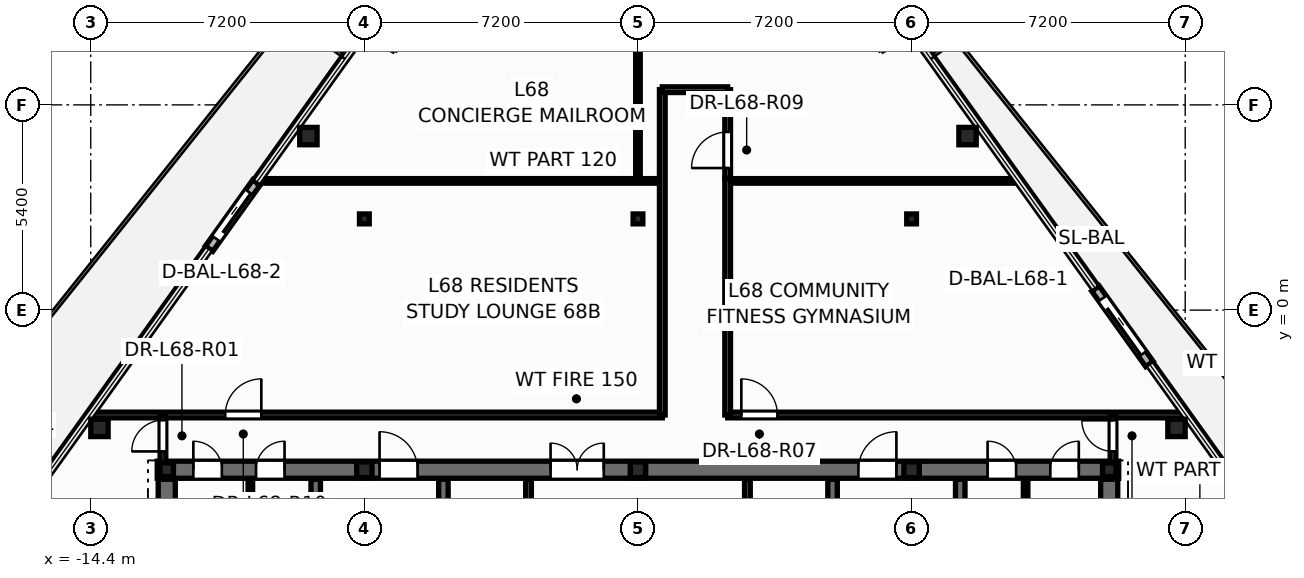
"""IFC4 building model, lengths in metres.
Left out: names, types, materials, properties, quantities, classifications, styles, units other than length and angle.
Written with IfcOpenShell. Run it as: python <this file> out.ifc"""

import sys

from ifc_helpers import new_model, si_unit, direction, frame, frame_2d, origin, origin_2d, place, context, subcontext, project, spatial, rectangle, hollow_circle, i_section, extrude, element, fill, save


model = new_model("IFC4")
c1 = context("Model", 3, precision=1e-05, world=origin(), true_north=direction((0.0, 1.0)))
c2 = subcontext(c1, "Body", "Model", "MODEL_VIEW")
j1 = project(units=[si_unit("LENGTHUNIT", "METRE"), si_unit("PLANEANGLEUNIT", "RADIAN")], contexts=[c1])
p1 = place(None, origin())
s1 = spatial("IfcSite", under=j1, at=p1, CompositionType="ELEMENT")
p2 = place(p1, origin())
s2 = spatial("IfcBuilding", under=s1, at=p2, CompositionType="ELEMENT")
p3 = place(p2, frame((0.0, 0.0, 259.8)))
s3 = spatial("IfcBuildingStorey", under=s2, at=p3, CompositionType="ELEMENT", Elevation=259.8)
for number, where, z_axis, x_axis in (
    (1, (14.171, -3.099, 0.0), (0.0, 0.0, 1.0), (1.0, 0.0, 0.0)),
    (2, (8.673, 4.579, 0.0), (0.0, 0.0, 1.0), (1.0, 0.0, 0.0)),
    (3, (-8.673, 4.579, 0.0), (0.0, 0.0, 1.0), (1.0, 0.0, 0.0)),
    (4, (-14.171, -3.099, 0.0), (0.0, 0.0, 1.0), (1.0, 0.0, 0.0)),
):
    element("IfcColumn", number, at=place(p3, frame(where, z_axis=z_axis, x_axis=x_axis)), inside=s3, PredefinedType="COLUMN", context=c2, shape_type="SweptSolid", body=[
        extrude(hollow_circle(Radius=0.229, WallThickness=0.016, at=origin_2d()), origin(), (0.0, 0.0, 1.0), 3.6),
    ])
for number, where, z_axis, x_axis in (
    (5, (12.4, -4.2, 0.0), (0.0, 0.0, 1.0), (1.0, 0.0, 0.0)),
    (6, (-12.4, -4.2, 0.0), (0.0, 0.0, 1.0), (1.0, 0.0, 0.0)),
):
    element("IfcColumn", number, at=place(p3, frame(where, z_axis=z_axis, x_axis=x_axis)), inside=s3, PredefinedType="COLUMN", context=c2, shape_type="SweptSolid", body=[
        extrude(i_section(OverallWidth=0.352, OverallDepth=0.359, WebThickness=0.018, FlangeThickness=0.026, at=origin_2d()), origin(), (0.0, 0.0, 1.0), 3.6),
    ])
for number, where, z_axis, x_axis in (
    (7, (-7.2, -4.2, 0.0), (0.0, 0.0, 1.0), (1.0, 0.0, 0.0)),
    (8, (0.0, -4.2, 0.0), (0.0, 0.0, 1.0), (1.0, 0.0, 0.0)),
    (9, (7.2, -4.2, 0.0), (0.0, 0.0, 1.0), (1.0, 0.0, 0.0)),
):
    element("IfcColumn", number, at=place(p3, frame(where, z_axis=z_axis, x_axis=x_axis)), inside=s3, PredefinedType="PILASTER", context=c2, shape_type="SweptSolid", body=[
        extrude(i_section(OverallWidth=0.405, OverallDepth=0.414, WebThickness=0.022, FlangeThickness=0.032, at=origin_2d()), origin(), (0.0, 0.0, 1.0), 3.6),
    ])
for number, where, z_axis, x_axis in (
    (10, (-7.2, 2.4, 0.0), (0.0, 0.0, 1.0), (1.0, 0.0, 0.0)),
    (11, (0.0, 2.4, 0.0), (0.0, 0.0, 1.0), (1.0, 0.0, 0.0)),
    (12, (7.2, 2.4, 0.0), (0.0, 0.0, 1.0), (1.0, 0.0, 0.0)),
):
    element("IfcColumn", number, at=place(p3, frame(where, z_axis=z_axis, x_axis=x_axis)), inside=s3, PredefinedType="COLUMN", context=c2, shape_type="SweptSolid", body=[
        extrude(i_section(OverallWidth=0.256, OverallDepth=0.26, WebThickness=0.01, FlangeThickness=0.017, at=origin_2d()), origin(), (0.0, 0.0, 1.0), 3.6),
    ])
p4 = place(p3, frame((13.458, -1.417, -0.015), z_axis=(0.0, 0.0, 1.0), x_axis=(-0.582146480264, 0.813083928949, 0.0)))
e13 = element("IfcWall", 13, at=p4, inside=s3, PredefinedType="STANDARD", context=c2, shape_type="SweptSolid", body=[
    extrude(rectangle(XDim=2.44, YDim=0.24, at=frame_2d((1.22, 0.0))), origin(), (0.0, 0.0, 1.0), 2.878),
])
p5 = place(p4, frame((0.32, 0.0, 0.015)))
e14 = element("IfcOpeningElement", 14, at=p5, cuts=e13, PredefinedType="OPENING", context=c2, shape_type="SweptSolid", body=[
    extrude(rectangle(XDim=1.806, YDim=2.204, at=frame_2d((0.9, 1.102))), frame((0.0, 0.13, 0.0), z_axis=(0.0, -1.0, 0.0), x_axis=(1.0, 0.0, 0.0)), (0.0, 0.0, 1.0), 0.26),
])
p6 = place(p3, frame((-10.039, 3.357, -0.015), z_axis=(0.0, 0.0, 1.0), x_axis=(-0.58216589686, -0.813070026832, 0.0)))
e15 = element("IfcWall", 15, at=p6, inside=s3, PredefinedType="STANDARD", context=c2, shape_type="SweptSolid", body=[
    extrude(rectangle(XDim=2.14, YDim=0.24, at=frame_2d((1.07, 0.0))), origin(), (0.0, 0.0, 1.0), 2.878),
])
p7 = place(p6, frame((0.32, 0.0, 0.015)))
e16 = element("IfcOpeningElement", 16, at=p7, cuts=e15, PredefinedType="OPENING", context=c2, shape_type="SweptSolid", body=[
    extrude(rectangle(XDim=1.506, YDim=2.204, at=frame_2d((0.75, 1.102))), frame((0.0, 0.13, 0.0), z_axis=(0.0, -1.0, 0.0), x_axis=(1.0, 0.0, 0.0)), (0.0, 0.0, 1.0), 0.26),
])
p8 = place(p3, frame((-2.88, -7.1, 0.0), z_axis=(0.0, 0.0, 1.0), x_axis=(0.0, 1.0, 0.0)))
e17 = element("IfcWall", 17, at=p8, inside=s3, PredefinedType="PARTITIONING", context=c2, shape_type="SweptSolid", body=[
    extrude(rectangle(XDim=2.65, YDim=0.15, at=frame_2d((1.325, 0.0))), origin(), (0.0, 0.0, 1.0), 3.345),
])
p9 = place(p8, frame((0.85, 0.0, 0.0)))
e18 = element("IfcOpeningElement", 18, at=p9, cuts=e17, PredefinedType="OPENING", context=c2, shape_type="SweptSolid", body=[
    extrude(rectangle(XDim=0.886, YDim=2.104, at=frame_2d((0.44, 1.052))), frame((0.0, 0.085, 0.0), z_axis=(0.0, -1.0, 0.0), x_axis=(1.0, 0.0, 0.0)), (0.0, 0.0, 1.0), 0.17),
])
p10 = place(p3, frame((2.88, -7.1, 0.0), z_axis=(0.0, 0.0, 1.0), x_axis=(0.0, 1.0, 0.0)))
e19 = element("IfcWall", 19, at=p10, inside=s3, PredefinedType="PARTITIONING", context=c2, shape_type="SweptSolid", body=[
    extrude(rectangle(XDim=2.65, YDim=0.15, at=frame_2d((1.325, 0.0))), origin(), (0.0, 0.0, 1.0), 3.345),
])
p11 = place(p10, frame((0.85, 0.0, 0.0)))
e20 = element("IfcOpeningElement", 20, at=p11, cuts=e19, PredefinedType="OPENING", context=c2, shape_type="SweptSolid", body=[
    extrude(rectangle(XDim=0.886, YDim=2.104, at=frame_2d((0.44, 1.052))), frame((0.0, 0.085, 0.0), z_axis=(0.0, -1.0, 0.0), x_axis=(1.0, 0.0, 0.0)), (0.0, 0.0, 1.0), 0.17),
])
for number, where, z_axis, x_axis in (
    (21, (-10.2, -5.52, 0.0), (0.0, 0.0, 1.0), (0.0, 1.0, 0.0)),
    (22, (10.2, -5.52, 0.0), (0.0, 0.0, 1.0), (0.0, 1.0, 0.0)),
):
    element("IfcWall", number, at=place(p3, frame(where, z_axis=z_axis, x_axis=x_axis)), inside=s3, PredefinedType="PARTITIONING", context=c2, shape_type="SweptSolid", body=[
        extrude(rectangle(XDim=1.12, YDim=0.12, at=frame_2d((0.56, 0.0))), origin(), (0.0, 0.0, 1.0), 3.345),
    ])
p12 = place(p3, frame((-12.65, -4.2, 0.0), z_axis=(0.0, 0.0, 1.0), x_axis=(1.0, 0.0, 0.0)))
e23 = element("IfcWall", 23, at=p12, inside=s3, PredefinedType="SHEAR", context=c2, shape_type="SweptSolid", body=[
    extrude(rectangle(XDim=25.3, YDim=0.45, at=frame_2d((12.65, 0.0))), origin(), (0.0, 0.0, 1.0), 3.6),
])
p13 = place(p12, frame((0.95, 0.0, 0.0)))
e24 = element("IfcOpeningElement", 24, at=p13, cuts=e23, PredefinedType="OPENING", context=c2, shape_type="SweptSolid", body=[
    extrude(rectangle(XDim=0.756, YDim=2.054, at=frame_2d((0.375, 1.027))), frame((0.0, 0.235, 0.0), z_axis=(0.0, -1.0, 0.0), x_axis=(1.0, 0.0, 0.0)), (0.0, 0.0, 1.0), 0.47),
])
p14 = place(p12, frame((2.6, 0.0, 0.0)))
e25 = element("IfcOpeningElement", 25, at=p14, cuts=e23, PredefinedType="OPENING", context=c2, shape_type="SweptSolid", body=[
    extrude(rectangle(XDim=0.756, YDim=2.054, at=frame_2d((0.375, 1.027))), frame((0.0, 0.235, 0.0), z_axis=(0.0, -1.0, 0.0), x_axis=(1.0, 0.0, 0.0)), (0.0, 0.0, 1.0), 0.47),
])
p15 = place(p12, frame((21.85, 0.0, 0.0)))
e26 = element("IfcOpeningElement", 26, at=p15, cuts=e23, PredefinedType="OPENING", context=c2, shape_type="SweptSolid", body=[
    extrude(rectangle(XDim=0.756, YDim=2.054, at=frame_2d((0.375, 1.027))), frame((0.0, 0.235, 0.0), z_axis=(0.0, -1.0, 0.0), x_axis=(1.0, 0.0, 0.0)), (0.0, 0.0, 1.0), 0.47),
])
p16 = place(p12, frame((23.5, 0.0, 0.0)))
e27 = element("IfcOpeningElement", 27, at=p16, cuts=e23, PredefinedType="OPENING", context=c2, shape_type="SweptSolid", body=[
    extrude(rectangle(XDim=0.756, YDim=2.054, at=frame_2d((0.375, 1.027))), frame((0.0, 0.235, 0.0), z_axis=(0.0, -1.0, 0.0), x_axis=(1.0, 0.0, 0.0)), (0.0, 0.0, 1.0), 0.47),
])
p17 = place(p12, frame((5.85, 0.0, 0.0)))
e28 = element("IfcOpeningElement", 28, at=p17, cuts=e23, PredefinedType="OPENING", context=c2, shape_type="SweptSolid", body=[
    extrude(rectangle(XDim=1.006, YDim=2.104, at=frame_2d((0.5, 1.052))), frame((0.0, 0.235, 0.0), z_axis=(0.0, -1.0, 0.0), x_axis=(1.0, 0.0, 0.0)), (0.0, 0.0, 1.0), 0.47),
])
p18 = place(p12, frame((10.35, 0.0, 0.0)))
e29 = element("IfcOpeningElement", 29, at=p18, cuts=e23, PredefinedType="OPENING", context=c2, shape_type="SweptSolid", body=[
    extrude(rectangle(XDim=1.406, YDim=2.154, at=frame_2d((0.7, 1.077))), frame((0.0, 0.235, 0.0), z_axis=(0.0, -1.0, 0.0), x_axis=(1.0, 0.0, 0.0)), (0.0, 0.0, 1.0), 0.47),
])
p19 = place(p12, frame((18.45, 0.0, 0.0)))
e30 = element("IfcOpeningElement", 30, at=p19, cuts=e23, PredefinedType="OPENING", context=c2, shape_type="SweptSolid", body=[
    extrude(rectangle(XDim=1.006, YDim=2.104, at=frame_2d((0.5, 1.052))), frame((0.0, 0.235, 0.0), z_axis=(0.0, -1.0, 0.0), x_axis=(1.0, 0.0, 0.0)), (0.0, 0.0, 1.0), 0.47),
])
p20 = place(p3, frame((-8.48, -13.85, 0.0), z_axis=(0.0, 0.0, 1.0), x_axis=(0.0, 1.0, 0.0)))
e31 = element("IfcWall", 31, at=p20, inside=s3, PredefinedType="SHEAR", context=c2, shape_type="SweptSolid", body=[
    extrude(rectangle(XDim=9.4, YDim=0.25, at=frame_2d((4.7, 0.0))), origin(), (0.0, 0.0, 1.0), 3.6),
])
p21 = place(p20, frame((6.95, 0.0, 0.0)))
e32 = element("IfcOpeningElement", 32, at=p21, cuts=e31, PredefinedType="OPENING", context=c2, shape_type="SweptSolid", body=[
    extrude(rectangle(XDim=1.006, YDim=2.104, at=frame_2d((0.5, 1.052))), frame((0.0, 0.135, 0.0), z_axis=(0.0, -1.0, 0.0), x_axis=(1.0, 0.0, 0.0)), (0.0, 0.0, 1.0), 0.27),
])
p22 = place(p3, frame((8.48, -13.85, 0.0), z_axis=(0.0, 0.0, 1.0), x_axis=(0.0, 1.0, 0.0)))
e33 = element("IfcWall", 33, at=p22, inside=s3, PredefinedType="SHEAR", context=c2, shape_type="SweptSolid", body=[
    extrude(rectangle(XDim=9.4, YDim=0.25, at=frame_2d((4.7, 0.0))), origin(), (0.0, 0.0, 1.0), 3.6),
])
p23 = place(p22, frame((6.95, 0.0, 0.0)))
e34 = element("IfcOpeningElement", 34, at=p23, cuts=e33, PredefinedType="OPENING", context=c2, shape_type="SweptSolid", body=[
    extrude(rectangle(XDim=1.006, YDim=2.104, at=frame_2d((0.5, 1.052))), frame((0.0, 0.135, 0.0), z_axis=(0.0, -1.0, 0.0), x_axis=(1.0, 0.0, 0.0)), (0.0, 0.0, 1.0), 0.27),
])
for number, where, z_axis, x_axis in (
    (35, (-5.12, -13.85, 0.0), (0.0, 0.0, 1.0), (0.0, 1.0, 0.0)),
    (36, (5.12, -13.85, 0.0), (0.0, 0.0, 1.0), (0.0, 1.0, 0.0)),
):
    element("IfcWall", number, at=place(p3, frame(where, z_axis=z_axis, x_axis=x_axis)), inside=s3, PredefinedType="SHEAR", context=c2, shape_type="SweptSolid", body=[
        extrude(rectangle(XDim=9.4, YDim=0.25, at=frame_2d((4.7, 0.0))), origin(), (0.0, 0.0, 1.0), 3.6),
    ])
for number, where, z_axis, x_axis in (
    (37, (-12.4, -13.85, 0.0), (0.0, 0.0, 1.0), (0.0, 1.0, 0.0)),
    (38, (12.4, -13.85, 0.0), (0.0, 0.0, 1.0), (0.0, 1.0, 0.0)),
):
    element("IfcWall", number, at=place(p3, frame(where, z_axis=z_axis, x_axis=x_axis)), inside=s3, PredefinedType="SHEAR", context=c2, shape_type="SweptSolid", body=[
        extrude(rectangle(XDim=9.4, YDim=0.45, at=frame_2d((4.7, 0.0))), origin(), (0.0, 0.0, 1.0), 3.6),
    ])
p24 = place(p3, frame((-14.42, -2.76, 0.0), z_axis=(0.0, 0.0, 1.0), x_axis=(1.0, 0.0, 0.0)))
e39 = element("IfcWall", 39, at=p24, inside=s3, PredefinedType="PARTITIONING", context=c2, shape_type="SweptSolid", body=[
    extrude(rectangle(XDim=15.06, YDim=0.15, at=frame_2d((7.53, 0.0))), origin(), (0.0, 0.0, 1.0), 2.32),
])
p25 = place(p24, frame((3.559, 0.0, 0.0)))
e40 = element("IfcOpeningElement", 40, at=p25, cuts=e39, PredefinedType="OPENING", context=c2, shape_type="SweptSolid", body=[
    extrude(rectangle(XDim=0.956, YDim=2.104, at=frame_2d((0.475, 1.052))), frame((0.0, 0.085, 0.0), z_axis=(0.0, -1.0, 0.0), x_axis=(1.0, 0.0, 0.0)), (0.0, 0.0, 1.0), 0.17),
])
p26 = place(p3, frame((2.36, -2.76, 0.0), z_axis=(0.0, 0.0, 1.0), x_axis=(1.0, 0.0, 0.0)))
e41 = element("IfcWall", 41, at=p26, inside=s3, PredefinedType="PARTITIONING", context=c2, shape_type="SweptSolid", body=[
    extrude(rectangle(XDim=12.06, YDim=0.15, at=frame_2d((6.03, 0.0))), origin(), (0.0, 0.0, 1.0), 2.32),
])
p27 = place(p26, frame((0.36, 0.0, 0.0)))
e42 = element("IfcOpeningElement", 42, at=p27, cuts=e41, PredefinedType="OPENING", context=c2, shape_type="SweptSolid", body=[
    extrude(rectangle(XDim=0.956, YDim=2.104, at=frame_2d((0.475, 1.052))), frame((0.0, 0.085, 0.0), z_axis=(0.0, -1.0, 0.0), x_axis=(1.0, 0.0, 0.0)), (0.0, 0.0, 1.0), 0.17),
])
p28 = place(p3, frame((0.0, 3.4, 0.0), z_axis=(0.0, 0.0, 1.0), x_axis=(0.0, 1.0, 0.0)))
e43 = element("IfcWall", 43, at=p28, inside=s3, PredefinedType="PARTITIONING", context=c2, shape_type="SweptSolid", body=[
    extrude(rectangle(XDim=10.537, YDim=0.12, at=frame_2d((5.269, 0.0))), origin(), (0.0, 0.0, 1.0), 2.32),
])
p29 = place(p28, frame((6.958, 0.0, 0.0)))
e44 = element("IfcOpeningElement", 44, at=p29, cuts=e43, PredefinedType="OPENING", context=c2, shape_type="SweptSolid", body=[
    extrude(rectangle(XDim=0.926, YDim=2.104, at=frame_2d((0.46, 1.052))), frame((0.0, 0.07, 0.0), z_axis=(0.0, -1.0, 0.0), x_axis=(1.0, 0.0, 0.0)), (0.0, 0.0, 1.0), 0.14),
])
p30 = place(p3, frame((-10.009, 3.4, 0.0), z_axis=(0.0, 0.0, 1.0), x_axis=(1.0, 0.0, 0.0)))
e45 = element("IfcWall", 45, at=p30, inside=s3, PredefinedType="PARTITIONING", context=c2, shape_type="SweptSolid", body=[
    extrude(rectangle(XDim=10.649, YDim=0.12, at=frame_2d((5.324, 0.0))), origin(), (0.0, 0.0, 1.0), 2.32),
])
p31 = place(p3, frame((2.36, 3.4, 0.0), z_axis=(0.0, 0.0, 1.0), x_axis=(1.0, 0.0, 0.0)))
e46 = element("IfcWall", 46, at=p31, inside=s3, PredefinedType="PARTITIONING", context=c2, shape_type="SweptSolid", body=[
    extrude(rectangle(XDim=7.649, YDim=0.12, at=frame_2d((3.824, 0.0))), origin(), (0.0, 0.0, 1.0), 2.32),
])
p32 = place(p3, frame((2.36, -2.76, 0.0), z_axis=(0.0, 0.0, 1.0), x_axis=(0.0, 1.0, 0.0)))
e47 = element("IfcWall", 47, at=p32, inside=s3, PredefinedType="PARTITIONING", context=c2, shape_type="SweptSolid", body=[
    extrude(rectangle(XDim=6.22, YDim=0.15, at=frame_2d((3.11, 0.0))), origin(), (0.0, 0.0, 1.0), 2.32),
])
p33 = place(p3, frame((0.64, -2.76, 0.0), z_axis=(0.0, 0.0, 1.0), x_axis=(0.0, 1.0, 0.0)))
e48 = element("IfcWall", 48, at=p33, inside=s3, PredefinedType="PARTITIONING", context=c2, shape_type="SweptSolid", body=[
    extrude(rectangle(XDim=8.56, YDim=0.15, at=frame_2d((4.28, 0.0))), origin(), (0.0, 0.0, 1.0), 2.32),
])
p34 = place(p3, frame((2.36, 3.462, 0.0), z_axis=(0.0, 0.0, 1.0), x_axis=(0.0, 1.0, 0.0)))
e49 = element("IfcWall", 49, at=p34, inside=s3, PredefinedType="PARTITIONING", context=c2, shape_type="SweptSolid", body=[
    extrude(rectangle(XDim=2.338, YDim=0.15, at=frame_2d((1.169, 0.0))), origin(), (0.0, 0.0, 1.0), 2.964),
])
p35 = place(p34, frame((0.276, 0.0, 0.0)))
e50 = element("IfcOpeningElement", 50, at=p35, cuts=e49, PredefinedType="OPENING", context=c2, shape_type="SweptSolid", body=[
    extrude(rectangle(XDim=0.956, YDim=2.104, at=frame_2d((0.475, 1.052))), frame((0.0, 0.085, 0.0), z_axis=(0.0, -1.0, 0.0), x_axis=(1.0, 0.0, 0.0)), (0.0, 0.0, 1.0), 0.17),
])
p36 = place(p3, frame((0.64, 5.8, 0.0), z_axis=(0.0, 0.0, 1.0), x_axis=(1.0, 0.0, 0.0)))
e51 = element("IfcWall", 51, at=p36, inside=s3, PredefinedType="PARTITIONING", context=c2, shape_type="SweptSolid", body=[
    extrude(rectangle(XDim=1.72, YDim=0.15, at=frame_2d((0.86, 0.0))), origin(), (0.0, 0.0, 1.0), 2.964),
])
p37 = place(p3, frame((-12.5, -4.24, 0.0), z_axis=(0.0, 0.0, 1.0), x_axis=(0.0, 1.0, 0.0)))
e52 = element("IfcWall", 52, at=p37, inside=s3, PredefinedType="PARTITIONING", context=c2, shape_type="SweptSolid", body=[
    extrude(rectangle(XDim=1.48, YDim=0.15, at=frame_2d((0.74, 0.0))), origin(), (0.0, 0.0, 1.0), 2.32),
])
p38 = place(p37, frame((0.522, 0.0, 0.0)))
e53 = element("IfcOpeningElement", 53, at=p38, cuts=e52, PredefinedType="OPENING", context=c2, shape_type="SweptSolid", body=[
    extrude(rectangle(XDim=0.826, YDim=2.104, at=frame_2d((0.41, 1.052))), frame((0.0, 0.085, 0.0), z_axis=(0.0, -1.0, 0.0), x_axis=(1.0, 0.0, 0.0)), (0.0, 0.0, 1.0), 0.17),
])
p39 = place(p3, frame((12.5, -4.24, 0.0), z_axis=(0.0, 0.0, 1.0), x_axis=(0.0, 1.0, 0.0)))
e54 = element("IfcWall", 54, at=p39, inside=s3, PredefinedType="PARTITIONING", context=c2, shape_type="SweptSolid", body=[
    extrude(rectangle(XDim=1.48, YDim=0.15, at=frame_2d((0.74, 0.0))), origin(), (0.0, 0.0, 1.0), 2.32),
])
p40 = place(p39, frame((0.522, 0.0, 0.0)))
e55 = element("IfcOpeningElement", 55, at=p40, cuts=e54, PredefinedType="OPENING", context=c2, shape_type="SweptSolid", body=[
    extrude(rectangle(XDim=0.826, YDim=2.104, at=frame_2d((0.41, 1.052))), frame((0.0, 0.085, 0.0), z_axis=(0.0, -1.0, 0.0), x_axis=(1.0, 0.0, 0.0)), (0.0, 0.0, 1.0), 0.17),
])
p41 = place(p5, origin())
e56 = element("IfcDoor", 56, at=p41, inside=s3, OperationType="SLIDING_TO_LEFT", PredefinedType="DOOR", context=c2, shape_type="SweptSolid", body=[
    extrude(rectangle(XDim=1.8, YDim=2.2, at=frame_2d((0.9, 1.1))), frame((0.0, 0.025, 0.0), z_axis=(0.0, -1.0, 0.0), x_axis=(1.0, 0.0, 0.0)), (0.0, 0.0, 1.0), 0.05),
])
fill(e14, e56)
p42 = place(p7, origin())
e57 = element("IfcDoor", 57, at=p42, inside=s3, OperationType="SLIDING_TO_RIGHT", PredefinedType="DOOR", context=c2, shape_type="SweptSolid", body=[
    extrude(rectangle(XDim=1.5, YDim=2.2, at=frame_2d((0.75, 1.1))), frame((0.0, 0.025, 0.0), z_axis=(0.0, -1.0, 0.0), x_axis=(1.0, 0.0, 0.0)), (0.0, 0.0, 1.0), 0.05),
])
fill(e16, e57)
p43 = place(p13, origin())
e58 = element("IfcDoor", 58, at=p43, inside=s3, OperationType="SINGLE_SWING_LEFT", PredefinedType="DOOR", context=c2, shape_type="SweptSolid", body=[
    extrude(rectangle(XDim=0.75, YDim=2.05, at=frame_2d((0.375, 1.025))), frame((0.0, 0.025, 0.0), z_axis=(0.0, -1.0, 0.0), x_axis=(1.0, 0.0, 0.0)), (0.0, 0.0, 1.0), 0.05),
])
fill(e24, e58)
p44 = place(p14, origin())
e59 = element("IfcDoor", 59, at=p44, inside=s3, OperationType="SINGLE_SWING_RIGHT", PredefinedType="DOOR", context=c2, shape_type="SweptSolid", body=[
    extrude(rectangle(XDim=0.75, YDim=2.05, at=frame_2d((0.375, 1.025))), frame((0.0, 0.025, 0.0), z_axis=(0.0, -1.0, 0.0), x_axis=(1.0, 0.0, 0.0)), (0.0, 0.0, 1.0), 0.05),
])
fill(e25, e59)
p45 = place(p15, origin())
e60 = element("IfcDoor", 60, at=p45, inside=s3, OperationType="SINGLE_SWING_LEFT", PredefinedType="DOOR", context=c2, shape_type="SweptSolid", body=[
    extrude(rectangle(XDim=0.75, YDim=2.05, at=frame_2d((0.375, 1.025))), frame((0.0, 0.025, 0.0), z_axis=(0.0, -1.0, 0.0), x_axis=(1.0, 0.0, 0.0)), (0.0, 0.0, 1.0), 0.05),
])
fill(e26, e60)
p46 = place(p16, origin())
e61 = element("IfcDoor", 61, at=p46, inside=s3, OperationType="SINGLE_SWING_RIGHT", PredefinedType="DOOR", context=c2, shape_type="SweptSolid", body=[
    extrude(rectangle(XDim=0.75, YDim=2.05, at=frame_2d((0.375, 1.025))), frame((0.0, 0.025, 0.0), z_axis=(0.0, -1.0, 0.0), x_axis=(1.0, 0.0, 0.0)), (0.0, 0.0, 1.0), 0.05),
])
fill(e27, e61)
p47 = place(p17, origin())
e62 = element("IfcDoor", 62, at=p47, inside=s3, OperationType="SINGLE_SWING_LEFT", PredefinedType="DOOR", context=c2, shape_type="SweptSolid", body=[
    extrude(rectangle(XDim=1.0, YDim=2.1, at=frame_2d((0.5, 1.05))), frame((0.0, 0.025, 0.0), z_axis=(0.0, -1.0, 0.0), x_axis=(1.0, 0.0, 0.0)), (0.0, 0.0, 1.0), 0.05),
])
fill(e28, e62)
p48 = place(p18, origin())
e63 = element("IfcDoor", 63, at=p48, inside=s3, OperationType="DOUBLE_DOOR_SINGLE_SWING", PredefinedType="DOOR", context=c2, shape_type="SweptSolid", body=[
    extrude(rectangle(XDim=1.4, YDim=2.15, at=frame_2d((0.7, 1.075))), frame((0.0, 0.025, 0.0), z_axis=(0.0, -1.0, 0.0), x_axis=(1.0, 0.0, 0.0)), (0.0, 0.0, 1.0), 0.05),
])
fill(e29, e63)
p49 = place(p19, origin())
e64 = element("IfcDoor", 64, at=p49, inside=s3, OperationType="SINGLE_SWING_RIGHT", PredefinedType="DOOR", context=c2, shape_type="SweptSolid", body=[
    extrude(rectangle(XDim=1.0, YDim=2.1, at=frame_2d((0.5, 1.05))), frame((0.0, 0.025, 0.0), z_axis=(0.0, -1.0, 0.0), x_axis=(1.0, 0.0, 0.0)), (0.0, 0.0, 1.0), 0.05),
])
fill(e30, e64)
p50 = place(p38, origin())
e65 = element("IfcDoor", 65, at=p50, inside=s3, OperationType="SINGLE_SWING_LEFT", PredefinedType="DOOR", context=c2, shape_type="SweptSolid", body=[
    extrude(rectangle(XDim=0.82, YDim=2.1, at=frame_2d((0.41, 1.05))), frame((0.0, 0.025, 0.0), z_axis=(0.0, -1.0, 0.0), x_axis=(1.0, 0.0, 0.0)), (0.0, 0.0, 1.0), 0.05),
])
fill(e53, e65)
p51 = place(p40, origin())
e66 = element("IfcDoor", 66, at=p51, inside=s3, OperationType="SINGLE_SWING_RIGHT", PredefinedType="DOOR", context=c2, shape_type="SweptSolid", body=[
    extrude(rectangle(XDim=0.82, YDim=2.1, at=frame_2d((0.41, 1.05))), frame((0.0, 0.025, 0.0), z_axis=(0.0, -1.0, 0.0), x_axis=(1.0, 0.0, 0.0)), (0.0, 0.0, 1.0), 0.05),
])
fill(e55, e66)
p52 = place(p27, origin())
e67 = element("IfcDoor", 67, at=p52, inside=s3, OperationType="SINGLE_SWING_LEFT", PredefinedType="DOOR", context=c2, shape_type="SweptSolid", body=[
    extrude(rectangle(XDim=0.95, YDim=2.1, at=frame_2d((0.475, 1.05))), frame((0.0, 0.025, 0.0), z_axis=(0.0, -1.0, 0.0), x_axis=(1.0, 0.0, 0.0)), (0.0, 0.0, 1.0), 0.05),
])
fill(e42, e67)
p53 = place(p35, origin())
e68 = element("IfcDoor", 68, at=p53, inside=s3, OperationType="SINGLE_SWING_LEFT", PredefinedType="DOOR", context=c2, shape_type="SweptSolid", body=[
    extrude(rectangle(XDim=0.95, YDim=2.1, at=frame_2d((0.475, 1.05))), frame((0.0, 0.025, 0.0), z_axis=(0.0, -1.0, 0.0), x_axis=(1.0, 0.0, 0.0)), (0.0, 0.0, 1.0), 0.05),
])
fill(e50, e68)
p54 = place(p25, origin())
e69 = element("IfcDoor", 69, at=p54, inside=s3, OperationType="SINGLE_SWING_RIGHT", PredefinedType="DOOR", context=c2, shape_type="SweptSolid", body=[
    extrude(rectangle(XDim=0.95, YDim=2.1, at=frame_2d((0.475, 1.05))), frame((0.0, 0.025, 0.0), z_axis=(0.0, -1.0, 0.0), x_axis=(1.0, 0.0, 0.0)), (0.0, 0.0, 1.0), 0.05),
])
fill(e40, e69)
save(model, sys.argv[1])
